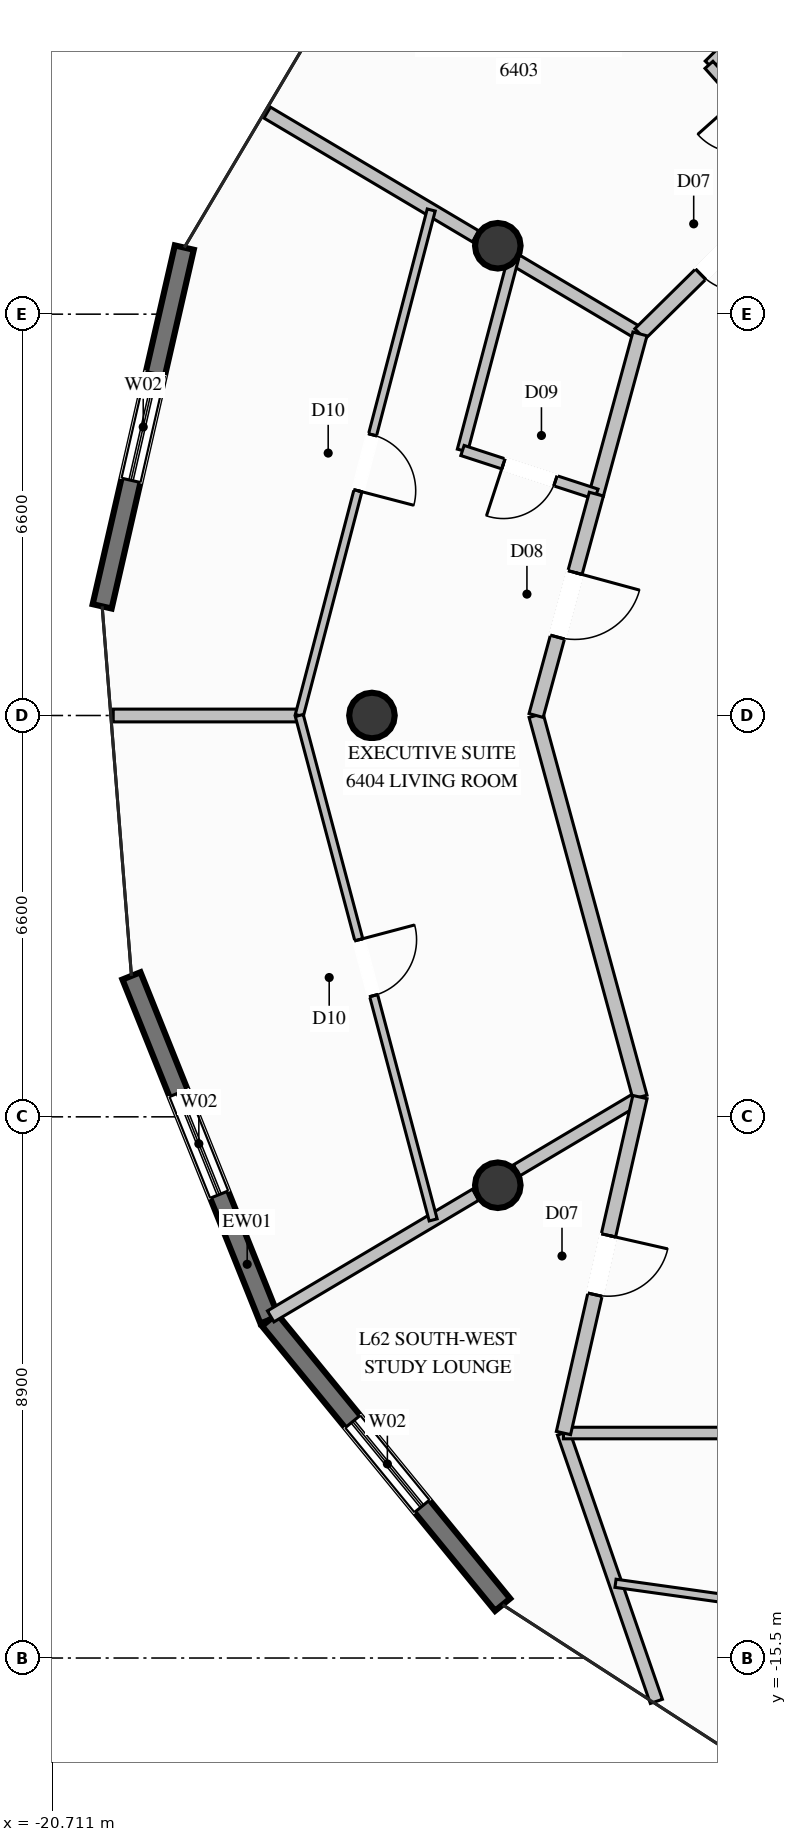
"""IFC4 building model, lengths in metres.
Left out: names, types, materials, properties, quantities, classifications, styles, units other than length and angle.
Written with IfcOpenShell. Run it as: python <this file> out.ifc"""

import sys

from ifc_helpers import new_model, si_unit, direction, frame, frame_2d, origin, origin_2d, place, context, subcontext, project, spatial, rectangle, circle, extrude, element, fill, save


model = new_model("IFC4")
c1 = context("Model", 3, precision=1e-05, world=origin(), true_north=direction((0.0, 1.0)))
c2 = subcontext(c1, "Body", "Model", "MODEL_VIEW")
j1 = project(units=[si_unit("LENGTHUNIT", "METRE"), si_unit("PLANEANGLEUNIT", "RADIAN")], contexts=[c1])
p1 = place(None, origin())
s1 = spatial("IfcSite", under=j1, at=p1, CompositionType="ELEMENT")
p2 = place(p1, origin())
s2 = spatial("IfcBuilding", under=s1, at=p2, CompositionType="ELEMENT")
p3 = place(p2, frame((0.0, 0.0, 239.2)))
s3 = spatial("IfcBuildingStorey", under=s2, at=p3, CompositionType="ELEMENT", Elevation=239.2)
for number, where, z_axis, x_axis in (
    (1, (-13.38, 7.725, 0.0), (0.0, 0.0, 1.0), (1.0, 0.0, 0.0)),
    (2, (-15.45, 0.0, 0.0), (0.0, 0.0, 1.0), (1.0, 0.0, 0.0)),
    (3, (-13.38, -7.725, 0.0), (0.0, 0.0, 1.0), (1.0, 0.0, 0.0)),
):
    element("IfcColumn", number, at=place(p3, frame(where, z_axis=z_axis, x_axis=x_axis)), inside=s3, PredefinedType="COLUMN", context=c2, shape_type="SweptSolid", body=[
        extrude(circle(Radius=0.375, at=origin_2d()), origin(), (0.0, 0.0, 1.0), 3.8),
    ])
p4 = place(p3, frame((-19.887, 1.795, 0.0), z_axis=(0.0, 0.0, 1.0), x_axis=(0.223212485592, 0.974769811943, 0.0)))
e4 = element("IfcWall", 4, at=p4, inside=s3, PredefinedType="SOLIDWALL", context=c2, shape_type="SweptSolid", body=[
    extrude(rectangle(XDim=6.053, YDim=0.32, at=frame_2d((3.026, 0.0))), origin(), (0.0, 0.0, 1.0), 3.57),
])
p5 = place(p4, frame((2.126, 0.0, 0.35)))
e5 = element("IfcOpeningElement", 5, at=p5, cuts=e4, PredefinedType="OPENING", context=c2, shape_type="SweptSolid", body=[
    extrude(rectangle(XDim=1.8, YDim=2.6, at=frame_2d((0.9, 1.3))), frame((0.0, 0.17, 0.0), z_axis=(0.0, -1.0, 0.0), x_axis=(1.0, 0.0, 0.0)), (0.0, 0.0, 1.0), 0.34),
])
p6 = place(p3, frame((-17.135, -9.939, 0.0), z_axis=(0.0, 0.0, 1.0), x_axis=(-0.372412492589, 0.928067311871, 0.0)))
e6 = element("IfcWall", 6, at=p6, inside=s3, PredefinedType="SOLIDWALL", context=c2, shape_type="SweptSolid", body=[
    extrude(rectangle(XDim=6.095, YDim=0.32, at=frame_2d((3.048, 0.0))), origin(), (0.0, 0.0, 1.0), 3.57),
])
p7 = place(p6, frame((2.22, 0.0, 0.35)))
e7 = element("IfcOpeningElement", 7, at=p7, cuts=e6, PredefinedType="OPENING", context=c2, shape_type="SweptSolid", body=[
    extrude(rectangle(XDim=1.8, YDim=2.6, at=frame_2d((0.9, 1.3))), frame((0.0, 0.17, 0.0), z_axis=(0.0, -1.0, 0.0), x_axis=(1.0, 0.0, 0.0)), (0.0, 0.0, 1.0), 0.34),
])
p8 = place(p3, frame((-13.301, -14.623, 0.0), z_axis=(0.0, 0.0, 1.0), x_axis=(-0.633391522875, 0.773831492478, 0.0)))
e8 = element("IfcWall", 8, at=p8, inside=s3, PredefinedType="SOLIDWALL", context=c2, shape_type="SweptSolid", body=[
    extrude(rectangle(XDim=6.053, YDim=0.32, at=frame_2d((3.027, 0.0))), origin(), (0.0, 0.0, 1.0), 3.57),
])
p9 = place(p8, frame((2.092, 0.0, 0.35)))
e9 = element("IfcOpeningElement", 9, at=p9, cuts=e8, PredefinedType="OPENING", context=c2, shape_type="SweptSolid", body=[
    extrude(rectangle(XDim=1.8, YDim=2.6, at=frame_2d((0.9, 1.3))), frame((0.0, 0.17, 0.0), z_axis=(0.0, -1.0, 0.0), x_axis=(1.0, 0.0, 0.0)), (0.0, 0.0, 1.0), 0.34),
])
p10 = place(p3, frame((-11.042, 6.275, 0.0), z_axis=(0.0, 0.0, 1.0), x_axis=(-0.859975377651, 0.510335526721, 0.0)))
e10 = element("IfcWall", 10, at=p10, inside=s3, PredefinedType="PARTITIONING", context=c2, shape_type="SweptSolid", body=[
    extrude(rectangle(XDim=2.359, YDim=0.21, at=frame_2d((1.18, 0.0))), origin(), (0.0, 0.0, 1.0), 3.011),
])
p11 = place(p3, frame((-13.744, 7.879, 0.0), z_axis=(0.0, 0.0, 1.0), x_axis=(-0.859849705024, 0.510547240488, 0.0)))
e11 = element("IfcWall", 11, at=p11, inside=s3, PredefinedType="PARTITIONING", context=c2, shape_type="SweptSolid", body=[
    extrude(rectangle(XDim=3.988, YDim=0.21, at=frame_2d((1.994, 0.0))), origin(), (0.0, 0.0, 1.0), 3.57),
])
p12 = place(p3, frame((-11.042, -6.275, 0.0), z_axis=(0.0, 0.0, 1.0), x_axis=(-0.859685751386, -0.510823265781, 0.0)))
e12 = element("IfcWall", 12, at=p12, inside=s3, PredefinedType="PARTITIONING", context=c2, shape_type="SweptSolid", body=[
    extrude(rectangle(XDim=2.359, YDim=0.21, at=frame_2d((1.18, 0.0))), origin(), (0.0, 0.0, 1.0), 3.011),
])
p13 = place(p3, frame((-13.744, -7.88, 0.0), z_axis=(0.0, 0.0, 1.0), x_axis=(-0.8597863995, -0.510653842867, 0.0)))
e13 = element("IfcWall", 13, at=p13, inside=s3, PredefinedType="PARTITIONING", context=c2, shape_type="SweptSolid", body=[
    extrude(rectangle(XDim=3.921, YDim=0.21, at=frame_2d((1.96, 0.0))), origin(), (0.0, 0.0, 1.0), 3.57),
])
p14 = place(p3, frame((-7.575, 13.007, 0.0), z_axis=(0.0, 0.0, 1.0), x_axis=(-0.710892186869, -0.703301001456, 0.0)))
e14 = element("IfcWall", 14, at=p14, inside=s3, PredefinedType="PLUMBINGWALL", context=c2, shape_type="SweptSolid", body=[
    extrude(rectangle(XDim=3.281, YDim=0.175, at=frame_2d((1.64, 0.0))), origin(), (0.0, 0.0, 1.0), 3.139),
])
p15 = place(p3, frame((-8.335, 8.94, 0.0), z_axis=(0.0, 0.0, 1.0), x_axis=(-0.666153503552, 0.745814661766, 0.0)))
e15 = element("IfcWall", 15, at=p15, inside=s3, PredefinedType="PLUMBINGWALL", context=c2, shape_type="SweptSolid", body=[
    extrude(rectangle(XDim=2.36, YDim=0.175, at=frame_2d((1.18, 0.0))), origin(), (0.0, 0.0, 1.0), 3.57),
])
p16 = place(p15, frame((0.73, 0.0, 0.0)))
e16 = element("IfcOpeningElement", 16, at=p16, cuts=e15, PredefinedType="OPENING", context=c2, shape_type="SweptSolid", body=[
    extrude(rectangle(XDim=0.9, YDim=2.1, at=frame_2d((0.45, 1.05))), frame((0.0, 0.098, 0.0), z_axis=(0.0, -1.0, 0.0), x_axis=(1.0, 0.0, 0.0)), (0.0, 0.0, 1.0), 0.195),
])
p17 = place(p3, frame((-8.335, 8.94, 0.0), z_axis=(0.0, 0.0, 1.0), x_axis=(-0.712612295011, -0.701558063883, 0.0)))
e17 = element("IfcWall", 17, at=p17, inside=s3, PredefinedType="PARTITIONING", context=c2, shape_type="SweptSolid", body=[
    extrude(rectangle(XDim=3.799, YDim=0.24, at=frame_2d((1.899, 0.0))), origin(), (0.0, 0.0, 1.0), 3.57),
])
p18 = place(p17, frame((1.399, 0.0, 0.0)))
e18 = element("IfcOpeningElement", 18, at=p18, cuts=e17, PredefinedType="OPENING", context=c2, shape_type="SweptSolid", body=[
    extrude(rectangle(XDim=1.0, YDim=2.2, at=frame_2d((0.5, 1.1))), frame((0.0, 0.13, 0.0), z_axis=(0.0, -1.0, 0.0), x_axis=(1.0, 0.0, 0.0)), (0.0, 0.0, 1.0), 0.26),
])
p19 = place(p3, frame((-11.042, 6.275, 0.0), z_axis=(0.0, 0.0, 1.0), x_axis=(-0.262572701387, -0.964912211803, 0.0)))
e19 = element("IfcWall", 19, at=p19, inside=s3, PredefinedType="PARTITIONING", context=c2, shape_type="SweptSolid", body=[
    extrude(rectangle(XDim=2.731, YDim=0.24, at=frame_2d((1.365, 0.0))), origin(), (0.0, 0.0, 1.0), 3.57),
])
p20 = place(p3, frame((-13.127, 7.513, 0.0), z_axis=(0.0, 0.0, 1.0), x_axis=(-0.25555737321, -0.966793891684, 0.0)))
e20 = element("IfcWall", 20, at=p20, inside=s3, PredefinedType="PLUMBINGWALL", context=c2, shape_type="SweptSolid", body=[
    extrude(rectangle(XDim=3.263, YDim=0.175, at=frame_2d((1.632, 0.0))), origin(), (0.0, 0.0, 1.0), 3.139),
])
p21 = place(p3, frame((-11.759, 3.64, 0.0), z_axis=(0.0, 0.0, 1.0), x_axis=(-0.950729164037, 0.310022671187, 0.0)))
e21 = element("IfcWall", 21, at=p21, inside=s3, PredefinedType="PLUMBINGWALL", context=c2, shape_type="SweptSolid", body=[
    extrude(rectangle(XDim=2.316, YDim=0.175, at=frame_2d((1.158, 0.0))), origin(), (0.0, 0.0, 1.0), 3.57),
])
p22 = place(p21, frame((0.708, 0.0, 0.0)))
e22 = element("IfcOpeningElement", 22, at=p22, cuts=e21, PredefinedType="OPENING", context=c2, shape_type="SweptSolid", body=[
    extrude(rectangle(XDim=0.9, YDim=2.1, at=frame_2d((0.45, 1.05))), frame((0.0, 0.098, 0.0), z_axis=(0.0, -1.0, 0.0), x_axis=(1.0, 0.0, 0.0)), (0.0, 0.0, 1.0), 0.195),
])
p23 = place(p3, frame((-16.645, 0.0, 0.0), z_axis=(0.0, 0.0, 1.0), x_axis=(-1.0, 0.0, 0.0)))
e23 = element("IfcWall", 23, at=p23, inside=s3, PredefinedType="PARTITIONING", context=c2, shape_type="SweptSolid", body=[
    extrude(rectangle(XDim=3.06, YDim=0.21, at=frame_2d((1.53, 0.0))), origin(), (0.0, 0.0, 1.0), 3.57),
])
p24 = place(p3, frame((-12.75, 0.0, 0.0), z_axis=(0.0, 0.0, 1.0), x_axis=(0.262640884433, -0.964893655189, 0.0)))
e24 = element("IfcWall", 24, at=p24, inside=s3, PredefinedType="PARTITIONING", context=c2, shape_type="SweptSolid", body=[
    extrude(rectangle(XDim=6.503, YDim=0.24, at=frame_2d((3.251, 0.0))), origin(), (0.0, 0.0, 1.0), 3.57),
])
p25 = place(p3, frame((-11.759, 3.64, 0.0), z_axis=(0.0, 0.0, 1.0), x_axis=(-0.2626902414, -0.964880219029, 0.0)))
e25 = element("IfcWall", 25, at=p25, inside=s3, PredefinedType="PARTITIONING", context=c2, shape_type="SweptSolid", body=[
    extrude(rectangle(XDim=3.772, YDim=0.24, at=frame_2d((1.886, 0.0))), origin(), (0.0, 0.0, 1.0), 3.57),
])
p26 = place(p25, frame((1.336, 0.0, 0.0)))
e26 = element("IfcOpeningElement", 26, at=p26, cuts=e25, PredefinedType="OPENING", context=c2, shape_type="SweptSolid", body=[
    extrude(rectangle(XDim=1.1, YDim=2.3, at=frame_2d((0.55, 1.15))), frame((0.0, 0.13, 0.0), z_axis=(0.0, -1.0, 0.0), x_axis=(1.0, 0.0, 0.0)), (0.0, 0.0, 1.0), 0.26),
])
p27 = place(p3, frame((-14.475, 8.313, 0.0), z_axis=(0.0, 0.0, 1.0), x_axis=(-0.252565334536, -0.967579842592, 0.0)))
e27 = element("IfcWall", 27, at=p27, inside=s3, PredefinedType="PARTITIONING", context=c2, shape_type="SweptSolid", body=[
    extrude(rectangle(XDim=8.592, YDim=0.135, at=frame_2d((4.296, 0.0))), origin(), (0.0, 0.0, 1.0), 3.57),
])
p28 = place(p27, frame((3.821, 0.0, 0.0)))
e28 = element("IfcOpeningElement", 28, at=p28, cuts=e27, PredefinedType="OPENING", context=c2, shape_type="SweptSolid", body=[
    extrude(rectangle(XDim=0.95, YDim=2.1, at=frame_2d((0.475, 1.05))), frame((0.0, 0.078, 0.0), z_axis=(0.0, -1.0, 0.0), x_axis=(1.0, 0.0, 0.0)), (0.0, 0.0, 1.0), 0.155),
])
p29 = place(p3, frame((-16.645, 0.0, 0.0), z_axis=(0.0, 0.0, 1.0), x_axis=(0.256566495237, -0.966526581901, 0.0)))
e29 = element("IfcWall", 29, at=p29, inside=s3, PredefinedType="PARTITIONING", context=c2, shape_type="SweptSolid", body=[
    extrude(rectangle(XDim=8.582, YDim=0.135, at=frame_2d((4.291, 0.0))), origin(), (0.0, 0.0, 1.0), 3.57),
])
p30 = place(p29, frame((3.816, 0.0, 0.0)))
e30 = element("IfcOpeningElement", 30, at=p30, cuts=e29, PredefinedType="OPENING", context=c2, shape_type="SweptSolid", body=[
    extrude(rectangle(XDim=0.95, YDim=2.1, at=frame_2d((0.475, 1.05))), frame((0.0, 0.078, 0.0), z_axis=(0.0, -1.0, 0.0), x_axis=(1.0, 0.0, 0.0)), (0.0, 0.0, 1.0), 0.155),
])
p31 = place(p3, frame((-12.3, -11.8, 0.0), z_axis=(0.0, 0.0, 1.0), x_axis=(0.327216501768, -0.944949395984, 0.0)))
e31 = element("IfcWall", 31, at=p31, inside=s3, PredefinedType="PARTITIONING", context=c2, shape_type="SweptSolid", body=[
    extrude(rectangle(XDim=4.67, YDim=0.21, at=frame_2d((2.335, 0.0))), origin(), (0.0, 0.0, 1.0), 3.57),
])
p32 = place(p3, frame((-12.3, -11.8, 0.0), z_axis=(0.0, 0.0, 1.0), x_axis=(1.0, 0.0, 0.0)))
e32 = element("IfcWall", 32, at=p32, inside=s3, PredefinedType="PARTITIONING", context=c2, shape_type="SweptSolid", body=[
    extrude(rectangle(XDim=12.3, YDim=0.19, at=frame_2d((6.15, 0.0))), origin(), (0.0, 0.0, 1.0), 3.57),
])
p33 = place(p32, frame((5.675, 0.0, 0.0)))
e33 = element("IfcOpeningElement", 33, at=p33, cuts=e32, PredefinedType="OPENING", context=c2, shape_type="SweptSolid", body=[
    extrude(rectangle(XDim=0.95, YDim=2.1, at=frame_2d((0.475, 1.05))), frame((0.0, 0.105, 0.0), z_axis=(0.0, -1.0, 0.0), x_axis=(1.0, 0.0, 0.0)), (0.0, 0.0, 1.0), 0.21),
])
p34 = place(p3, frame((-11.042, -6.275, 0.0), z_axis=(0.0, 0.0, 1.0), x_axis=(-0.222014008723, -0.975043475918, 0.0)))
e34 = element("IfcWall", 34, at=p34, inside=s3, PredefinedType="PARTITIONING", context=c2, shape_type="SweptSolid", body=[
    extrude(rectangle(XDim=5.667, YDim=0.24, at=frame_2d((2.833, 0.0))), origin(), (0.0, 0.0, 1.0), 3.57),
])
p35 = place(p34, frame((2.333, 0.0, 0.0)))
e35 = element("IfcOpeningElement", 35, at=p35, cuts=e34, PredefinedType="OPENING", context=c2, shape_type="SweptSolid", body=[
    extrude(rectangle(XDim=1.0, YDim=2.2, at=frame_2d((0.5, 1.1))), frame((0.0, 0.13, 0.0), z_axis=(0.0, -1.0, 0.0), x_axis=(1.0, 0.0, 0.0)), (0.0, 0.0, 1.0), 0.26),
])
p36 = place(p3, frame((-11.444, -14.271, 0.0), z_axis=(0.0, 0.0, 1.0), x_axis=(0.990280714827, -0.139083089705, 0.0)))
e36 = element("IfcWall", 36, at=p36, inside=s3, PredefinedType="PARTITIONING", context=c2, shape_type="SweptSolid", body=[
    extrude(rectangle(XDim=11.784, YDim=0.135, at=frame_2d((5.892, 0.0))), origin(), (0.0, 0.0, 1.0), 3.139),
])
p37 = place(p36, frame((5.417, 0.0, 0.0)))
e37 = element("IfcOpeningElement", 37, at=p37, cuts=e36, PredefinedType="OPENING", context=c2, shape_type="SweptSolid", body=[
    extrude(rectangle(XDim=0.95, YDim=2.1, at=frame_2d((0.475, 1.05))), frame((0.0, 0.078, 0.0), z_axis=(0.0, -1.0, 0.0), x_axis=(1.0, 0.0, 0.0)), (0.0, 0.0, 1.0), 0.155),
])
p38 = place(p5, origin())
e38 = element("IfcWindow", 38, at=p38, inside=s3, PartitioningType="SINGLE_PANEL", PredefinedType="WINDOW", context=c2, shape_type="SweptSolid", body=[
    extrude(rectangle(XDim=1.8, YDim=2.6, at=frame_2d((0.9, 1.3))), frame((0.0, 0.03, 0.0), z_axis=(0.0, -1.0, 0.0), x_axis=(1.0, 0.0, 0.0)), (0.0, 0.0, 1.0), 0.06),
])
fill(e5, e38)
p39 = place(p7, origin())
e39 = element("IfcWindow", 39, at=p39, inside=s3, PartitioningType="SINGLE_PANEL", PredefinedType="WINDOW", context=c2, shape_type="SweptSolid", body=[
    extrude(rectangle(XDim=1.8, YDim=2.6, at=frame_2d((0.9, 1.3))), frame((0.0, 0.03, 0.0), z_axis=(0.0, -1.0, 0.0), x_axis=(1.0, 0.0, 0.0)), (0.0, 0.0, 1.0), 0.06),
])
fill(e7, e39)
p40 = place(p9, origin())
e40 = element("IfcWindow", 40, at=p40, inside=s3, PartitioningType="SINGLE_PANEL", PredefinedType="WINDOW", context=c2, shape_type="SweptSolid", body=[
    extrude(rectangle(XDim=1.8, YDim=2.6, at=frame_2d((0.9, 1.3))), frame((0.0, 0.03, 0.0), z_axis=(0.0, -1.0, 0.0), x_axis=(1.0, 0.0, 0.0)), (0.0, 0.0, 1.0), 0.06),
])
fill(e9, e40)
p41 = place(p18, origin())
e41 = element("IfcDoor", 41, at=p41, inside=s3, OperationType="SINGLE_SWING_LEFT", PredefinedType="DOOR", context=c2, shape_type="SweptSolid", body=[
    extrude(rectangle(XDim=1.0, YDim=2.2, at=frame_2d((0.5, 1.1))), frame((0.0, 0.025, 0.0), z_axis=(0.0, -1.0, 0.0), x_axis=(1.0, 0.0, 0.0)), (0.0, 0.0, 1.0), 0.05),
])
fill(e18, e41)
p42 = place(p22, origin())
e42 = element("IfcDoor", 42, at=p42, inside=s3, OperationType="SINGLE_SWING_RIGHT", PredefinedType="DOOR", context=c2, shape_type="SweptSolid", body=[
    extrude(rectangle(XDim=0.9, YDim=2.1, at=frame_2d((0.45, 1.05))), frame((0.0, 0.025, 0.0), z_axis=(0.0, -1.0, 0.0), x_axis=(1.0, 0.0, 0.0)), (0.0, 0.0, 1.0), 0.05),
])
fill(e22, e42)
p43 = place(p26, origin())
e43 = element("IfcDoor", 43, at=p43, inside=s3, OperationType="SINGLE_SWING_LEFT", PredefinedType="DOOR", context=c2, shape_type="SweptSolid", body=[
    extrude(rectangle(XDim=1.1, YDim=2.3, at=frame_2d((0.55, 1.15))), frame((0.0, 0.025, 0.0), z_axis=(0.0, -1.0, 0.0), x_axis=(1.0, 0.0, 0.0)), (0.0, 0.0, 1.0), 0.05),
])
fill(e26, e43)
p44 = place(p28, origin())
e44 = element("IfcDoor", 44, at=p44, inside=s3, OperationType="SINGLE_SWING_RIGHT", PredefinedType="DOOR", context=c2, shape_type="SweptSolid", body=[
    extrude(rectangle(XDim=0.95, YDim=2.1, at=frame_2d((0.475, 1.05))), frame((0.0, 0.025, 0.0), z_axis=(0.0, -1.0, 0.0), x_axis=(1.0, 0.0, 0.0)), (0.0, 0.0, 1.0), 0.05),
])
fill(e28, e44)
p45 = place(p30, origin())
e45 = element("IfcDoor", 45, at=p45, inside=s3, OperationType="SINGLE_SWING_LEFT", PredefinedType="DOOR", context=c2, shape_type="SweptSolid", body=[
    extrude(rectangle(XDim=0.95, YDim=2.1, at=frame_2d((0.475, 1.05))), frame((0.0, 0.025, 0.0), z_axis=(0.0, -1.0, 0.0), x_axis=(1.0, 0.0, 0.0)), (0.0, 0.0, 1.0), 0.05),
])
fill(e30, e45)
p46 = place(p35, origin())
e46 = element("IfcDoor", 46, at=p46, inside=s3, OperationType="SINGLE_SWING_LEFT", PredefinedType="DOOR", context=c2, shape_type="SweptSolid", body=[
    extrude(rectangle(XDim=1.0, YDim=2.2, at=frame_2d((0.5, 1.1))), frame((0.0, 0.025, 0.0), z_axis=(0.0, -1.0, 0.0), x_axis=(1.0, 0.0, 0.0)), (0.0, 0.0, 1.0), 0.05),
])
fill(e35, e46)
save(model, sys.argv[1])
